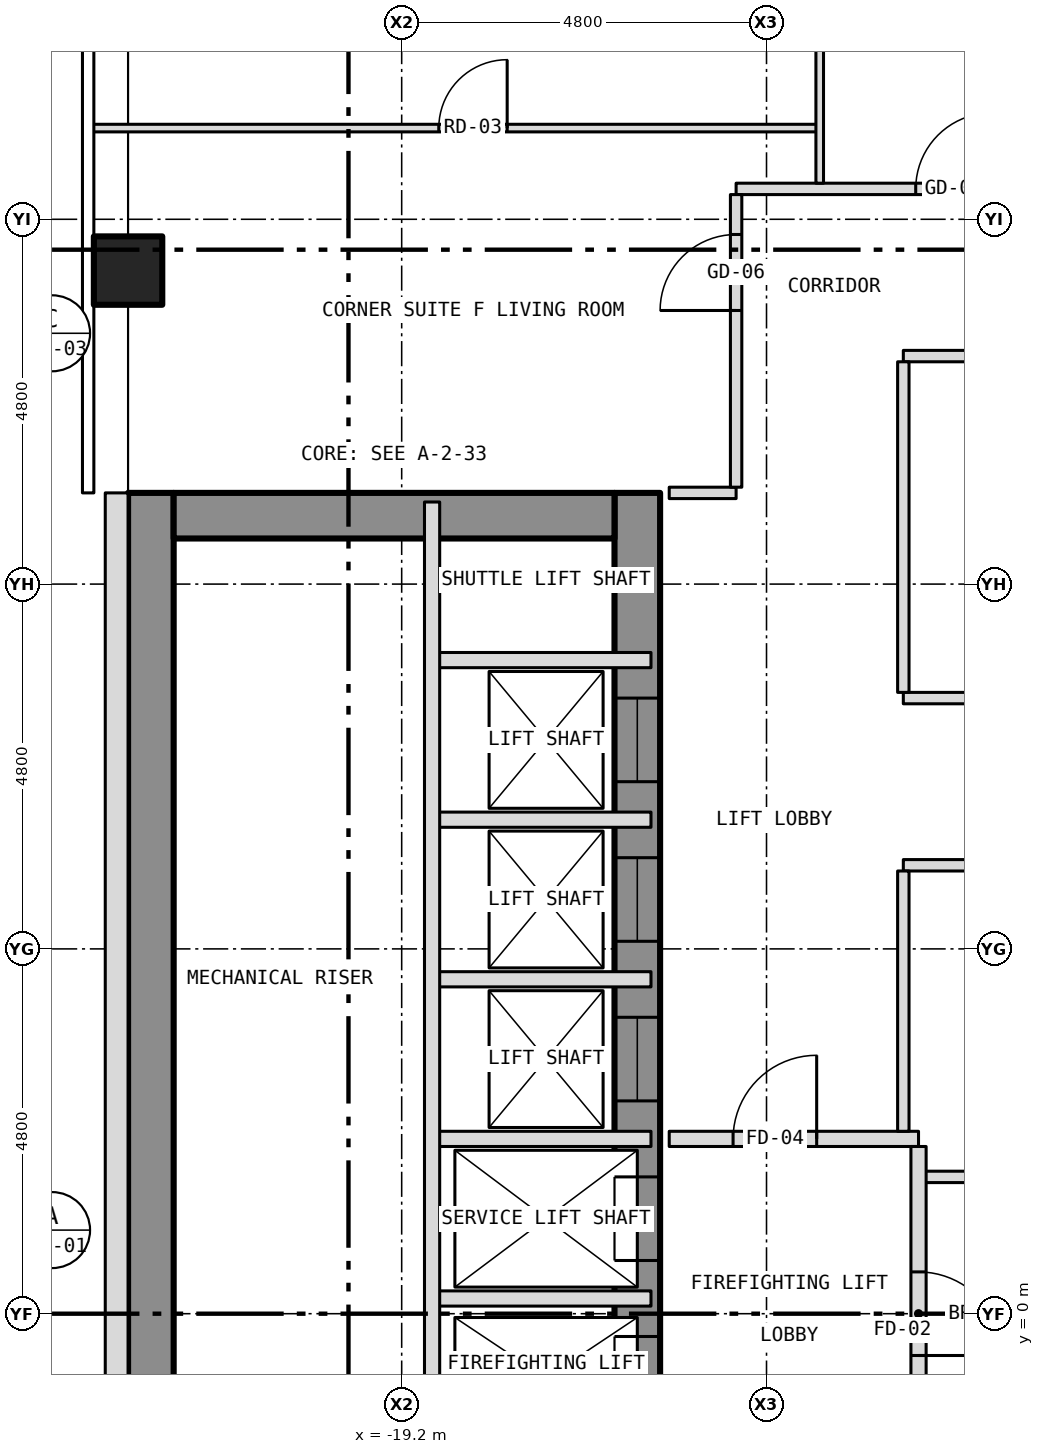
"""IFC4 building model, lengths in metres.
Left out: names, types, materials, properties, quantities, classifications, styles, units other than length and angle.
Written with IfcOpenShell. Run it as: python <this file> out.ifc"""

import sys

from ifc_helpers import new_model, si_unit, direction, frame, frame_2d, origin, origin_2d, place, context, subcontext, project, spatial, rectangle, hollow_rectangle, extrude, element, fill, save


model = new_model("IFC4")
c1 = context("Model", 3, precision=1e-05, world=origin(), true_north=direction((0.0, 1.0)))
c2 = subcontext(c1, "Body", "Model", "MODEL_VIEW")
j1 = project(units=[si_unit("LENGTHUNIT", "METRE"), si_unit("PLANEANGLEUNIT", "RADIAN")], contexts=[c1])
p1 = place(None, origin())
s1 = spatial("IfcSite", under=j1, at=p1, CompositionType="ELEMENT")
p2 = place(p1, origin())
s2 = spatial("IfcBuilding", under=s1, at=p2, CompositionType="ELEMENT")
p3 = place(p2, frame((0.0, 0.0, 120.5)))
s3 = spatial("IfcBuildingStorey", under=s2, at=p3, CompositionType="ELEMENT", Elevation=120.5)
p4 = place(p3, frame((-22.8, 13.725, -0.15), z_axis=(0.0, 0.0, 1.0), x_axis=(1.0, 0.0, 0.0)))
e1 = element("IfcColumn", 1, at=p4, inside=s3, PredefinedType="COLUMN", context=c2, shape_type="SweptSolid", body=[
    extrude(hollow_rectangle(XDim=0.9, YDim=0.9, WallThickness=0.05, at=origin_2d()), origin(), (0.0, 0.0, 1.0), 3.5),
])
p5 = place(p3, frame((-16.1, -10.8, 0.0), z_axis=(0.0, 0.0, 1.0), x_axis=(0.0, 1.0, 0.0)))
e2 = element("IfcWall", 2, at=p5, inside=s3, PredefinedType="SHEAR", context=c2, shape_type="SweptSolid", body=[
    extrude(rectangle(XDim=21.6, YDim=0.6, at=frame_2d((10.8, 0.0))), origin(), (0.0, 0.0, 1.0), 3.25),
])
p6 = place(p5, frame((9.4, 0.0, 0.0)))
e3 = element("IfcOpeningElement", 3, at=p6, cuts=e2, PredefinedType="OPENING", context=c2, shape_type="SweptSolid", body=[
    extrude(rectangle(XDim=1.1, YDim=2.1, at=frame_2d((0.55, 1.05))), frame((0.0, 0.312, 0.0), z_axis=(0.0, -1.0, 0.0), x_axis=(1.0, 0.0, 0.0)), (0.0, 0.0, 1.0), 0.624),
])
p7 = place(p5, frame((11.5, 0.0, 0.0)))
e4 = element("IfcOpeningElement", 4, at=p7, cuts=e2, PredefinedType="OPENING", context=c2, shape_type="SweptSolid", body=[
    extrude(rectangle(XDim=1.1, YDim=2.1, at=frame_2d((0.55, 1.05))), frame((0.0, 0.312, 0.0), z_axis=(0.0, -1.0, 0.0), x_axis=(1.0, 0.0, 0.0)), (0.0, 0.0, 1.0), 0.624),
])
p8 = place(p5, frame((13.6, 0.0, 0.0)))
e5 = element("IfcOpeningElement", 5, at=p8, cuts=e2, PredefinedType="OPENING", context=c2, shape_type="SweptSolid", body=[
    extrude(rectangle(XDim=1.1, YDim=2.1, at=frame_2d((0.55, 1.05))), frame((0.0, 0.312, 0.0), z_axis=(0.0, -1.0, 0.0), x_axis=(1.0, 0.0, 0.0)), (0.0, 0.0, 1.0), 0.624),
])
p9 = place(p5, frame((15.7, 0.0, 0.0)))
e6 = element("IfcOpeningElement", 6, at=p9, cuts=e2, PredefinedType="OPENING", context=c2, shape_type="SweptSolid", body=[
    extrude(rectangle(XDim=1.1, YDim=2.1, at=frame_2d((0.55, 1.05))), frame((0.0, 0.312, 0.0), z_axis=(0.0, -1.0, 0.0), x_axis=(1.0, 0.0, 0.0)), (0.0, 0.0, 1.0), 0.624),
])
p10 = place(p5, frame((17.8, 0.0, 0.0)))
e7 = element("IfcOpeningElement", 7, at=p10, cuts=e2, PredefinedType="OPENING", context=c2, shape_type="SweptSolid", body=[
    extrude(rectangle(XDim=1.1, YDim=2.1, at=frame_2d((0.55, 1.05))), frame((0.0, 0.312, 0.0), z_axis=(0.0, -1.0, 0.0), x_axis=(1.0, 0.0, 0.0)), (0.0, 0.0, 1.0), 0.624),
])
p11 = place(p5, frame((0.758, 0.0, 0.0)))
e8 = element("IfcOpeningElement", 8, at=p11, cuts=e2, PredefinedType="OPENING", context=c2, shape_type="SweptSolid", body=[
    extrude(rectangle(XDim=1.1, YDim=2.1, at=frame_2d((0.55, 1.05))), frame((0.0, 0.312, 0.0), z_axis=(0.0, -1.0, 0.0), x_axis=(1.0, 0.0, 0.0)), (0.0, 0.0, 1.0), 0.624),
])
p12 = place(p5, frame((7.5, 0.0, 0.0)))
e9 = element("IfcOpeningElement", 9, at=p12, cuts=e2, PredefinedType="OPENING", context=c2, shape_type="SweptSolid", body=[
    extrude(rectangle(XDim=1.1, YDim=2.1, at=frame_2d((0.55, 1.05))), frame((0.0, 0.312, 0.0), z_axis=(0.0, -1.0, 0.0), x_axis=(1.0, 0.0, 0.0)), (0.0, 0.0, 1.0), 0.624),
])
p13 = place(p3, frame((-22.5, -10.8, 0.0), z_axis=(0.0, 0.0, 1.0), x_axis=(0.0, 1.0, 0.0)))
e10 = element("IfcWall", 10, at=p13, inside=s3, PredefinedType="SHEAR", context=c2, shape_type="SweptSolid", body=[
    extrude(rectangle(XDim=21.6, YDim=0.6, at=frame_2d((10.8, 0.0))), origin(), (0.0, 0.0, 1.0), 3.25),
])
p14 = place(p3, frame((-22.2, 10.5, 0.0), z_axis=(0.0, 0.0, 1.0), x_axis=(1.0, 0.0, 0.0)))
e11 = element("IfcWall", 11, at=p14, inside=s3, PredefinedType="SHEAR", context=c2, shape_type="SweptSolid", body=[
    extrude(rectangle(XDim=5.8, YDim=0.6, at=frame_2d((2.9, 0.0))), origin(), (0.0, 0.0, 1.0), 3.25),
])
p15 = place(p3, frame((-22.95, 10.8, 0.0), z_axis=(0.0, 0.0, 1.0), x_axis=(0.0, -1.0, 0.0)))
e12 = element("IfcWall", 12, at=p15, inside=s3, PredefinedType="SOLIDWALL", context=c2, shape_type="SweptSolid", body=[
    extrude(rectangle(XDim=21.6, YDim=0.3, at=frame_2d((10.8, 0.0))), origin(), (0.0, 0.0, 1.0), 3.5),
])
p16 = place(p15, frame((18.05, 0.0, 1.0)))
e13 = element("IfcOpeningElement", 13, at=p16, cuts=e12, PredefinedType="OPENING", context=c2, shape_type="SweptSolid", body=[
    extrude(rectangle(XDim=0.6, YDim=1.5, at=frame_2d((0.3, 0.75))), frame((0.0, 0.162, 0.0), z_axis=(0.0, -1.0, 0.0), x_axis=(1.0, 0.0, 0.0)), (0.0, 0.0, 1.0), 0.324),
])
p17 = place(p3, frame((-18.8, 0.2, 0.0), z_axis=(0.0, 0.0, 1.0), x_axis=(1.0, 0.0, 0.0)))
e14 = element("IfcWall", 14, at=p17, inside=s3, PredefinedType="PARTITIONING", context=c2, shape_type="SweptSolid", body=[
    extrude(rectangle(XDim=2.88, YDim=0.2, at=frame_2d((1.44, 0.0))), origin(), (0.0, 0.0, 1.0), 3.25),
])
p18 = place(p3, frame((-12.4, 1.8, 0.0), z_axis=(0.0, 0.0, 1.0), x_axis=(1.0, 0.0, 0.0)))
e15 = element("IfcWall", 15, at=p18, inside=s3, PredefinedType="PARTITIONING", context=c2, shape_type="SweptSolid", body=[
    extrude(rectangle(XDim=4.48, YDim=0.15, at=frame_2d((2.24, 0.0))), origin(), (0.0, 0.0, 1.0), 3.35),
])
p19 = place(p3, frame((-18.8, 2.3, 0.0), z_axis=(0.0, 0.0, 1.0), x_axis=(1.0, 0.0, 0.0)))
e16 = element("IfcWall", 16, at=p19, inside=s3, PredefinedType="PARTITIONING", context=c2, shape_type="SweptSolid", body=[
    extrude(rectangle(XDim=2.88, YDim=0.2, at=frame_2d((1.44, 0.0))), origin(), (0.0, 0.0, 1.0), 3.25),
])
p20 = place(p3, frame((-15.68, 2.3, 0.0), z_axis=(0.0, 0.0, 1.0), x_axis=(1.0, 0.0, 0.0)))
e17 = element("IfcWall", 17, at=p20, inside=s3, PredefinedType="PARTITIONING", context=c2, shape_type="SweptSolid", body=[
    extrude(rectangle(XDim=3.28, YDim=0.2, at=frame_2d((1.64, 0.0))), origin(), (0.0, 0.0, 1.0), 3.35),
])
p21 = place(p20, frame((0.84, 0.0, 0.0)))
e18 = element("IfcOpeningElement", 18, at=p21, cuts=e17, PredefinedType="OPENING", context=c2, shape_type="SweptSolid", body=[
    extrude(rectangle(XDim=1.1, YDim=2.1, at=frame_2d((0.55, 1.05))), frame((0.0, 0.112, 0.0), z_axis=(0.0, -1.0, 0.0), x_axis=(1.0, 0.0, 0.0)), (0.0, 0.0, 1.0), 0.224),
])
p22 = place(p3, frame((-18.8, 4.4, 0.0), z_axis=(0.0, 0.0, 1.0), x_axis=(1.0, 0.0, 0.0)))
e19 = element("IfcWall", 19, at=p22, inside=s3, PredefinedType="PARTITIONING", context=c2, shape_type="SweptSolid", body=[
    extrude(rectangle(XDim=2.88, YDim=0.2, at=frame_2d((1.44, 0.0))), origin(), (0.0, 0.0, 1.0), 3.25),
])
p23 = place(p3, frame((-12.6, 5.9, 0.0), z_axis=(0.0, 0.0, 1.0), x_axis=(1.0, 0.0, 0.0)))
e20 = element("IfcWall", 20, at=p23, inside=s3, PredefinedType="PARTITIONING", context=c2, shape_type="SweptSolid", body=[
    extrude(rectangle(XDim=4.68, YDim=0.15, at=frame_2d((2.34, 0.0))), origin(), (0.0, 0.0, 1.0), 3.35),
])
p24 = place(p23, frame((1.875, 0.0, 0.0)))
e21 = element("IfcOpeningElement", 21, at=p24, cuts=e20, PredefinedType="OPENING", context=c2, shape_type="SweptSolid", body=[
    extrude(rectangle(XDim=0.9, YDim=2.1, at=frame_2d((0.45, 1.05))), frame((0.0, 0.087, 0.0), z_axis=(0.0, -1.0, 0.0), x_axis=(1.0, 0.0, 0.0)), (0.0, 0.0, 1.0), 0.174),
])
p25 = place(p3, frame((-18.8, 6.5, 0.0), z_axis=(0.0, 0.0, 1.0), x_axis=(1.0, 0.0, 0.0)))
e22 = element("IfcWall", 22, at=p25, inside=s3, PredefinedType="PARTITIONING", context=c2, shape_type="SweptSolid", body=[
    extrude(rectangle(XDim=2.88, YDim=0.2, at=frame_2d((1.44, 0.0))), origin(), (0.0, 0.0, 1.0), 3.25),
])
p26 = place(p3, frame((-12.6, 8.1, 0.0), z_axis=(0.0, 0.0, 1.0), x_axis=(1.0, 0.0, 0.0)))
e23 = element("IfcWall", 23, at=p26, inside=s3, PredefinedType="PARTITIONING", context=c2, shape_type="SweptSolid", body=[
    extrude(rectangle(XDim=4.68, YDim=0.15, at=frame_2d((2.34, 0.0))), origin(), (0.0, 0.0, 1.0), 3.35),
])
p27 = place(p26, frame((1.875, 0.0, 0.0)))
e24 = element("IfcOpeningElement", 24, at=p27, cuts=e23, PredefinedType="OPENING", context=c2, shape_type="SweptSolid", body=[
    extrude(rectangle(XDim=0.9, YDim=2.1, at=frame_2d((0.45, 1.05))), frame((0.0, 0.087, 0.0), z_axis=(0.0, -1.0, 0.0), x_axis=(1.0, 0.0, 0.0)), (0.0, 0.0, 1.0), 0.174),
])
p28 = place(p3, frame((-18.8, 8.6, 0.0), z_axis=(0.0, 0.0, 1.0), x_axis=(1.0, 0.0, 0.0)))
e25 = element("IfcWall", 25, at=p28, inside=s3, PredefinedType="PARTITIONING", context=c2, shape_type="SweptSolid", body=[
    extrude(rectangle(XDim=2.88, YDim=0.2, at=frame_2d((1.44, 0.0))), origin(), (0.0, 0.0, 1.0), 3.25),
])
p29 = place(p3, frame((-15.68, 10.8, 0.0), z_axis=(0.0, 0.0, 1.0), x_axis=(1.0, 0.0, 0.0)))
e26 = element("IfcWall", 26, at=p29, inside=s3, PredefinedType="PARTITIONING", context=c2, shape_type="SweptSolid", body=[
    extrude(rectangle(XDim=0.88, YDim=0.15, at=frame_2d((0.44, 0.0))), origin(), (0.0, 0.0, 1.0), 3.35),
])
p30 = place(p3, frame((-12.6, 12.6, 0.0), z_axis=(0.0, 0.0, 1.0), x_axis=(1.0, 0.0, 0.0)))
e27 = element("IfcWall", 27, at=p30, inside=s3, PredefinedType="PARTITIONING", context=c2, shape_type="SweptSolid", body=[
    extrude(rectangle(XDim=4.68, YDim=0.15, at=frame_2d((2.34, 0.0))), origin(), (0.0, 0.0, 1.0), 3.35),
])
p31 = place(p3, frame((-14.8, 14.8, 0.0), z_axis=(0.0, 0.0, 1.0), x_axis=(1.0, 0.0, 0.0)))
e28 = element("IfcWall", 28, at=p31, inside=s3, PredefinedType="PARTITIONING", context=c2, shape_type="SweptSolid", body=[
    extrude(rectangle(XDim=6.85, YDim=0.15, at=frame_2d((3.425, 0.0))), origin(), (0.0, 0.0, 1.0), 3.35),
])
p32 = place(p31, frame((2.363, 0.0, 0.0)))
e29 = element("IfcOpeningElement", 29, at=p32, cuts=e28, PredefinedType="OPENING", context=c2, shape_type="SweptSolid", body=[
    extrude(rectangle(XDim=1.0, YDim=2.1, at=frame_2d((0.5, 1.05))), frame((0.0, 0.087, 0.0), z_axis=(0.0, -1.0, 0.0), x_axis=(1.0, 0.0, 0.0)), (0.0, 0.0, 1.0), 0.174),
])
p33 = place(p3, frame((-23.28, 15.6, 0.0), z_axis=(0.0, 0.0, 1.0), x_axis=(1.0, 0.0, 0.0)))
e30 = element("IfcWall", 30, at=p33, inside=s3, PredefinedType="PARTITIONING", context=c2, shape_type="SweptSolid", body=[
    extrude(rectangle(XDim=9.58, YDim=0.1, at=frame_2d((4.79, 0.0))), origin(), (0.0, 0.0, 1.0), 3.35),
])
p34 = place(p33, frame((4.568, 0.0, 0.0)))
e31 = element("IfcOpeningElement", 31, at=p34, cuts=e30, PredefinedType="OPENING", context=c2, shape_type="SweptSolid", body=[
    extrude(rectangle(XDim=0.9, YDim=2.1, at=frame_2d((0.45, 1.05))), frame((0.0, 0.062, 0.0), z_axis=(0.0, -1.0, 0.0), x_axis=(1.0, 0.0, 0.0)), (0.0, 0.0, 1.0), 0.124),
])
p35 = place(p3, frame((-18.8, -1.8, 0.0), z_axis=(0.0, 0.0, 1.0), x_axis=(0.0, 1.0, 0.0)))
e32 = element("IfcWall", 32, at=p35, inside=s3, PredefinedType="PARTITIONING", context=c2, shape_type="SweptSolid", body=[
    extrude(rectangle(XDim=12.48, YDim=0.2, at=frame_2d((6.24, 0.0))), origin(), (0.0, 0.0, 1.0), 3.25),
])
p36 = place(p3, frame((-14.8, 10.875, 0.0), z_axis=(0.0, 0.0, 1.0), x_axis=(0.0, 1.0, 0.0)))
e33 = element("IfcWall", 33, at=p36, inside=s3, PredefinedType="PARTITIONING", context=c2, shape_type="SweptSolid", body=[
    extrude(rectangle(XDim=3.85, YDim=0.15, at=frame_2d((1.925, 0.0))), origin(), (0.0, 0.0, 1.0), 3.35),
])
p37 = place(p36, frame((2.325, 0.0, 0.0)))
e34 = element("IfcOpeningElement", 34, at=p37, cuts=e33, PredefinedType="OPENING", context=c2, shape_type="SweptSolid", body=[
    extrude(rectangle(XDim=1.0, YDim=2.1, at=frame_2d((0.5, 1.05))), frame((0.0, 0.087, 0.0), z_axis=(0.0, -1.0, 0.0), x_axis=(1.0, 0.0, 0.0)), (0.0, 0.0, 1.0), 0.174),
])
p38 = place(p3, frame((-13.7, 14.875, 0.0), z_axis=(0.0, 0.0, 1.0), x_axis=(0.0, 1.0, 0.0)))
e35 = element("IfcWall", 35, at=p38, inside=s3, PredefinedType="PARTITIONING", context=c2, shape_type="SweptSolid", body=[
    extrude(rectangle(XDim=7.805, YDim=0.1, at=frame_2d((3.902, 0.0))), origin(), (0.0, 0.0, 1.0), 3.35),
])
p39 = place(p3, frame((-12.6, 2.4, 0.0), z_axis=(0.0, 0.0, 1.0), x_axis=(0.0, 1.0, 0.0)))
e36 = element("IfcWall", 36, at=p39, inside=s3, PredefinedType="PARTITIONING", context=c2, shape_type="SweptSolid", body=[
    extrude(rectangle(XDim=3.425, YDim=0.15, at=frame_2d((1.712, 0.0))), origin(), (0.0, 0.0, 1.0), 3.35),
])
p40 = place(p3, frame((-12.6, 8.175, 0.0), z_axis=(0.0, 0.0, 1.0), x_axis=(0.0, 1.0, 0.0)))
e37 = element("IfcWall", 37, at=p40, inside=s3, PredefinedType="PARTITIONING", context=c2, shape_type="SweptSolid", body=[
    extrude(rectangle(XDim=4.35, YDim=0.15, at=frame_2d((2.175, 0.0))), origin(), (0.0, 0.0, 1.0), 3.35),
])
p41 = place(p3, frame((-12.4, -1.8, 0.0), z_axis=(0.0, 0.0, 1.0), x_axis=(0.0, 1.0, 0.0)))
e38 = element("IfcWall", 38, at=p41, inside=s3, PredefinedType="PARTITIONING", context=c2, shape_type="SweptSolid", body=[
    extrude(rectangle(XDim=4.0, YDim=0.2, at=frame_2d((2.0, 0.0))), origin(), (0.0, 0.0, 1.0), 3.35),
])
p42 = place(p41, frame((1.25, 0.0, 0.0)))
e39 = element("IfcOpeningElement", 39, at=p42, cuts=e38, PredefinedType="OPENING", context=c2, shape_type="SweptSolid", body=[
    extrude(rectangle(XDim=1.1, YDim=2.1, at=frame_2d((0.55, 1.05))), frame((0.0, 0.112, 0.0), z_axis=(0.0, -1.0, 0.0), x_axis=(1.0, 0.0, 0.0)), (0.0, 0.0, 1.0), 0.224),
])
p43 = place(p6, origin())
e40 = element("IfcDoor", 40, at=p43, inside=s3, OperationType="SLIDING_TO_LEFT", PredefinedType="DOOR", context=c2, shape_type="SweptSolid", body=[
    extrude(rectangle(XDim=1.1, YDim=2.1, at=frame_2d((0.55, 1.05))), frame((0.0, 0.025, 0.0), z_axis=(0.0, -1.0, 0.0), x_axis=(1.0, 0.0, 0.0)), (0.0, 0.0, 1.0), 0.05),
])
fill(e3, e40)
p44 = place(p7, origin())
e41 = element("IfcDoor", 41, at=p44, inside=s3, OperationType="SLIDING_TO_LEFT", PredefinedType="DOOR", context=c2, shape_type="SweptSolid", body=[
    extrude(rectangle(XDim=1.1, YDim=2.1, at=frame_2d((0.55, 1.05))), frame((0.0, 0.025, 0.0), z_axis=(0.0, -1.0, 0.0), x_axis=(1.0, 0.0, 0.0)), (0.0, 0.0, 1.0), 0.05),
])
fill(e4, e41)
p45 = place(p8, origin())
e42 = element("IfcDoor", 42, at=p45, inside=s3, OperationType="SLIDING_TO_LEFT", PredefinedType="DOOR", context=c2, shape_type="SweptSolid", body=[
    extrude(rectangle(XDim=1.1, YDim=2.1, at=frame_2d((0.55, 1.05))), frame((0.0, 0.025, 0.0), z_axis=(0.0, -1.0, 0.0), x_axis=(1.0, 0.0, 0.0)), (0.0, 0.0, 1.0), 0.05),
])
fill(e5, e42)
p46 = place(p9, origin())
e43 = element("IfcDoor", 43, at=p46, inside=s3, OperationType="SLIDING_TO_LEFT", PredefinedType="DOOR", context=c2, shape_type="SweptSolid", body=[
    extrude(rectangle(XDim=1.1, YDim=2.1, at=frame_2d((0.55, 1.05))), frame((0.0, 0.025, 0.0), z_axis=(0.0, -1.0, 0.0), x_axis=(1.0, 0.0, 0.0)), (0.0, 0.0, 1.0), 0.05),
])
fill(e6, e43)
p47 = place(p10, origin())
e44 = element("IfcDoor", 44, at=p47, inside=s3, OperationType="SLIDING_TO_LEFT", PredefinedType="DOOR", context=c2, shape_type="SweptSolid", body=[
    extrude(rectangle(XDim=1.1, YDim=2.1, at=frame_2d((0.55, 1.05))), frame((0.0, 0.025, 0.0), z_axis=(0.0, -1.0, 0.0), x_axis=(1.0, 0.0, 0.0)), (0.0, 0.0, 1.0), 0.05),
])
fill(e7, e44)
p48 = place(p42, origin())
e45 = element("IfcDoor", 45, at=p48, inside=s3, OperationType="SINGLE_SWING_LEFT", PredefinedType="DOOR", context=c2, shape_type="SweptSolid", body=[
    extrude(rectangle(XDim=1.1, YDim=2.1, at=frame_2d((0.55, 1.05))), frame((0.0, 0.025, 0.0), z_axis=(0.0, -1.0, 0.0), x_axis=(1.0, 0.0, 0.0)), (0.0, 0.0, 1.0), 0.05),
])
fill(e39, e45)
p49 = place(p21, origin())
e46 = element("IfcDoor", 46, at=p49, inside=s3, OperationType="SINGLE_SWING_RIGHT", PredefinedType="DOOR", context=c2, shape_type="SweptSolid", body=[
    extrude(rectangle(XDim=1.1, YDim=2.1, at=frame_2d((0.55, 1.05))), frame((0.0, 0.025, 0.0), z_axis=(0.0, -1.0, 0.0), x_axis=(1.0, 0.0, 0.0)), (0.0, 0.0, 1.0), 0.05),
])
fill(e18, e46)
p50 = place(p32, origin())
e47 = element("IfcDoor", 47, at=p50, inside=s3, OperationType="SINGLE_SWING_RIGHT", PredefinedType="DOOR", context=c2, shape_type="SweptSolid", body=[
    extrude(rectangle(XDim=1.0, YDim=2.1, at=frame_2d((0.5, 1.05))), frame((0.0, 0.025, 0.0), z_axis=(0.0, -1.0, 0.0), x_axis=(1.0, 0.0, 0.0)), (0.0, 0.0, 1.0), 0.05),
])
fill(e29, e47)
p51 = place(p37, origin())
e48 = element("IfcDoor", 48, at=p51, inside=s3, OperationType="SINGLE_SWING_LEFT", PredefinedType="DOOR", context=c2, shape_type="SweptSolid", body=[
    extrude(rectangle(XDim=1.0, YDim=2.1, at=frame_2d((0.5, 1.05))), frame((0.0, 0.025, 0.0), z_axis=(0.0, -1.0, 0.0), x_axis=(1.0, 0.0, 0.0)), (0.0, 0.0, 1.0), 0.05),
])
fill(e34, e48)
p52 = place(p34, origin())
e49 = element("IfcDoor", 49, at=p52, inside=s3, OperationType="SINGLE_SWING_RIGHT", PredefinedType="DOOR", context=c2, shape_type="SweptSolid", body=[
    extrude(rectangle(XDim=0.9, YDim=2.1, at=frame_2d((0.45, 1.05))), frame((0.0, 0.025, 0.0), z_axis=(0.0, -1.0, 0.0), x_axis=(1.0, 0.0, 0.0)), (0.0, 0.0, 1.0), 0.05),
])
fill(e31, e49)
save(model, sys.argv[1])
